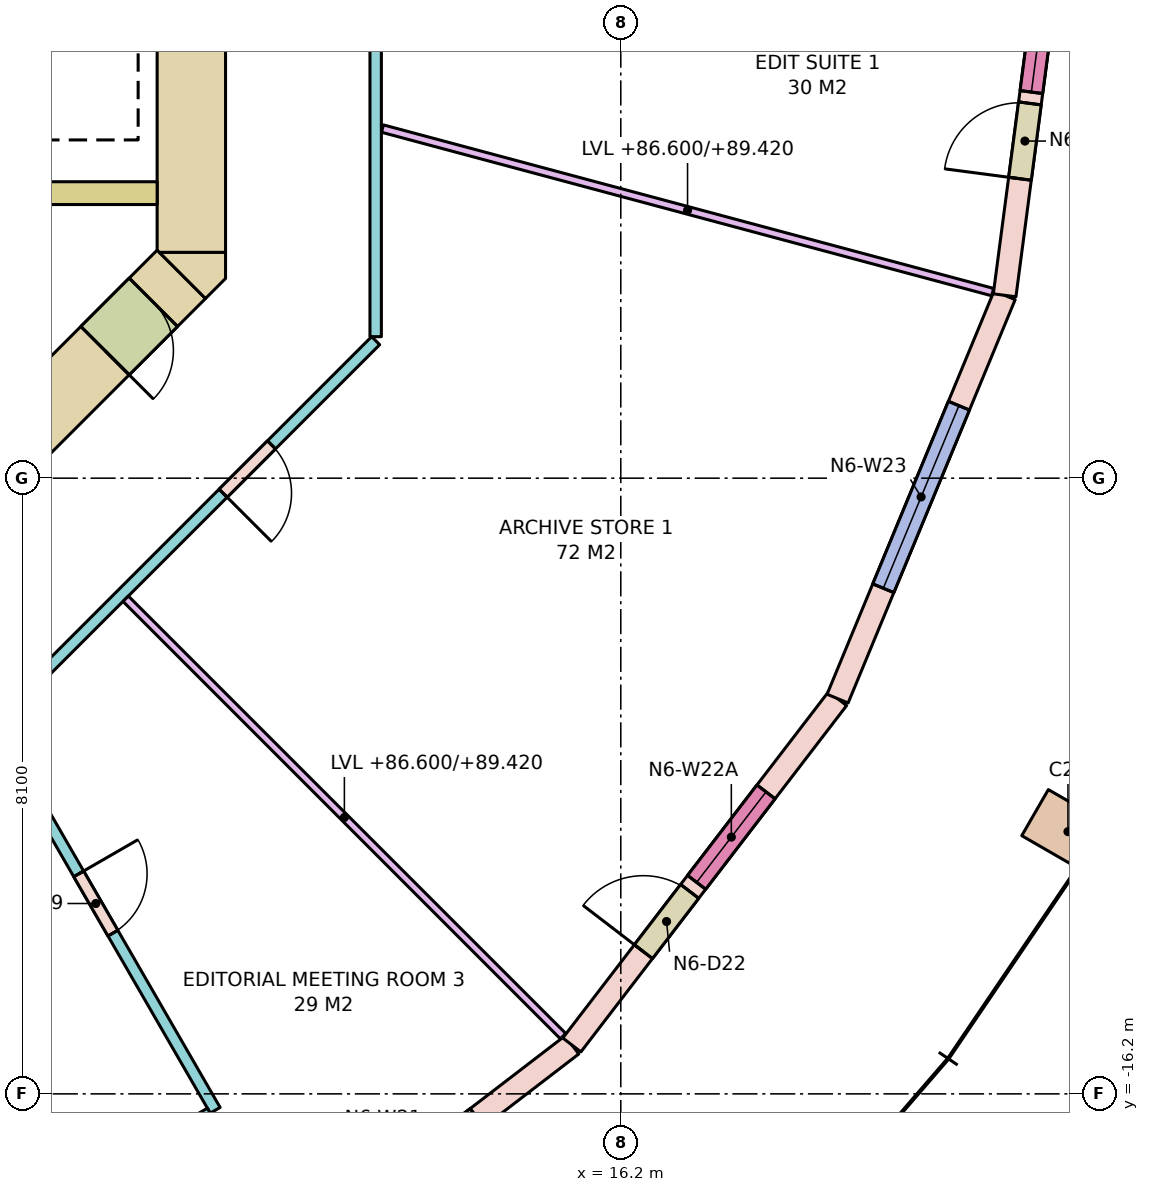
"""IFC4 building model, lengths in metres.
Left out: names, types, materials, properties, quantities, classifications, styles, units other than length and angle.
Written with IfcOpenShell. Run it as: python <this file> out.ifc"""

import sys

from ifc_helpers import new_model, si_unit, direction, frame, frame_2d, origin, origin_2d, place, context, subcontext, project, spatial, polyline, rectangle, outline, extrude, element, fill, save


model = new_model("IFC4")
c1 = context("Model", 3, precision=1e-05, world=origin(), true_north=direction((0.0, 1.0)))
c2 = subcontext(c1, "Body", "Model", "MODEL_VIEW")
j1 = project(units=[si_unit("LENGTHUNIT", "METRE"), si_unit("PLANEANGLEUNIT", "RADIAN")], contexts=[c1])
p1 = place(None, origin())
s1 = spatial("IfcSite", under=j1, at=p1, CompositionType="ELEMENT")
p2 = place(p1, origin())
s2 = spatial("IfcBuilding", under=s1, at=p2, CompositionType="ELEMENT")
p3 = place(p2, frame((0.0, 0.0, 86.6)))
s3 = spatial("IfcBuildingStorey", under=s2, at=p3, CompositionType="ELEMENT", Elevation=86.6)
p4 = place(p3, frame((22.084, -12.75, 0.0), z_axis=(0.0, 0.0, 1.0), x_axis=(0.5, 0.866025403784, 0.0)))
e1 = element("IfcColumn", 1, at=p4, inside=s3, PredefinedType="COLUMN", context=c2, shape_type="SweptSolid", body=[
    extrude(rectangle(XDim=0.7, YDim=1.0, at=origin_2d()), origin(), (0.0, 0.0, 1.0), 4.0),
])
p5 = place(p3, frame((10.55, -5.13, -0.28), z_axis=(0.0, 0.0, 1.0), x_axis=(0.0, 1.0, 0.0)))
e2 = element("IfcWall", 2, at=p5, inside=s3, PredefinedType="SHEAR", context=c2, shape_type="SweptSolid", body=[
    extrude(rectangle(XDim=10.26, YDim=0.9, at=frame_2d((5.13, 0.0))), origin(), (0.0, 0.0, 1.0), 4.0),
])
p6 = place(p5, frame((4.13, 0.0, 0.28)))
e3 = element("IfcOpeningElement", 3, at=p6, cuts=e2, PredefinedType="OPENING", context=c2, shape_type="SweptSolid", body=[
    extrude(rectangle(XDim=2.0, YDim=2.1, at=frame_2d((1.0, 1.05))), frame((0.0, 0.46, 0.0), z_axis=(0.0, -1.0, 0.0), x_axis=(1.0, 0.0, 0.0)), (0.0, 0.0, 1.0), 0.92),
])
p7 = place(p3, frame((10.418, -5.418, -0.28), z_axis=(0.0, 0.0, 1.0), x_axis=(-0.707106781187, -0.707106781187, 0.0)))
e4 = element("IfcWall", 4, at=p7, inside=s3, PredefinedType="SHEAR", context=c2, shape_type="SweptSolid", body=[
    extrude(rectangle(XDim=4.243, YDim=0.9, at=frame_2d((2.121, 0.0))), origin(), (0.0, 0.0, 1.0), 4.0),
])
p8 = place(p7, frame((0.52, 0.0, 0.28)))
e5 = element("IfcOpeningElement", 5, at=p8, cuts=e4, PredefinedType="OPENING", context=c2, shape_type="SweptSolid", body=[
    extrude(rectangle(XDim=0.9, YDim=2.1, at=frame_2d((0.45, 1.05))), frame((0.0, 0.46, 0.0), z_axis=(0.0, -1.0, 0.0), x_axis=(1.0, 0.0, 0.0)), (0.0, 0.0, 1.0), 0.92),
])
p9 = place(p3, frame((0.0, 0.0, -0.28)))
e6 = element("IfcWall", 6, at=p9, inside=s3, PredefinedType="SHEAR", context=c2, shape_type="SweptSolid", body=[
    extrude(outline(polyline([(11.0, -5.473), (10.736, -5.736), (10.13, -5.13), (11.0, -5.13), (11.0, -5.473)])), origin(), (0.0, 0.0, 1.0), 4.0),
])
p10 = place(p3, frame((2.0, -4.35, 0.0), z_axis=(0.0, 0.0, 1.0), x_axis=(1.0, 0.0, 0.0)))
e7 = element("IfcWall", 7, at=p10, inside=s3, PredefinedType="SOLIDWALL", context=c2, shape_type="SweptSolid", body=[
    extrude(rectangle(XDim=8.1, YDim=0.3, at=frame_2d((4.05, 0.0))), origin(), (0.0, 0.0, 1.0), 3.72),
])
p11 = place(p3, frame((11.0, -19.052, 0.0), z_axis=(0.0, 0.0, 1.0), x_axis=(0.793366142647, 0.608744744291, 0.0)))
e8 = element("IfcWall", 8, at=p11, inside=s3, PredefinedType="STANDARD", context=c2, shape_type="SweptSolid", body=[
    extrude(rectangle(XDim=5.743, YDim=0.3, at=frame_2d((2.872, 0.0))), origin(), (0.0, 0.0, 1.0), 3.72),
])
p12 = place(p11, frame((1.572, 0.0, 0.8)))
e9 = element("IfcOpeningElement", 9, at=p12, cuts=e8, PredefinedType="OPENING", context=c2, shape_type="SweptSolid", body=[
    extrude(rectangle(XDim=2.6, YDim=2.7, at=frame_2d((1.3, 1.35))), frame((0.0, 0.16, 0.0), z_axis=(0.0, -1.0, 0.0), x_axis=(1.0, 0.0, 0.0)), (0.0, 0.0, 1.0), 0.32),
])
p13 = place(p3, frame((15.556, -15.556, 0.0), z_axis=(0.0, 0.0, 1.0), x_axis=(0.608744744291, 0.793366142647, 0.0)))
e10 = element("IfcWall", 10, at=p13, inside=s3, PredefinedType="STANDARD", context=c2, shape_type="SweptSolid", body=[
    extrude(rectangle(XDim=5.743, YDim=0.3, at=frame_2d((2.872, 0.0))), origin(), (0.0, 0.0, 1.0), 3.72),
])
p14 = place(p13, frame((1.547, 0.0, 0.0)))
e11 = element("IfcOpeningElement", 11, at=p14, cuts=e10, PredefinedType="OPENING", context=c2, shape_type="SweptSolid", body=[
    extrude(rectangle(XDim=1.0, YDim=2.4, at=frame_2d((0.5, 1.2))), frame((0.0, 0.16, 0.0), z_axis=(0.0, -1.0, 0.0), x_axis=(1.0, 0.0, 0.0)), (0.0, 0.0, 1.0), 0.32),
])
p15 = place(p13, frame((2.697, 0.0, 0.8)))
e12 = element("IfcOpeningElement", 12, at=p15, cuts=e10, PredefinedType="OPENING", context=c2, shape_type="SweptSolid", body=[
    extrude(rectangle(XDim=1.5, YDim=2.7, at=frame_2d((0.75, 1.35))), frame((0.0, 0.16, 0.0), z_axis=(0.0, -1.0, 0.0), x_axis=(1.0, 0.0, 0.0)), (0.0, 0.0, 1.0), 0.32),
])
p16 = place(p3, frame((19.052, -11.0, 0.0), z_axis=(0.0, 0.0, 1.0), x_axis=(0.382715966503, 0.923866055759, 0.0)))
e13 = element("IfcWall", 13, at=p16, inside=s3, PredefinedType="STANDARD", context=c2, shape_type="SweptSolid", body=[
    extrude(rectangle(XDim=5.743, YDim=0.3, at=frame_2d((2.872, 0.0))), origin(), (0.0, 0.0, 1.0), 3.72),
])
p17 = place(p16, frame((1.572, 0.0, 0.8)))
e14 = element("IfcOpeningElement", 14, at=p17, cuts=e13, PredefinedType="OPENING", context=c2, shape_type="SweptSolid", body=[
    extrude(rectangle(XDim=2.6, YDim=2.7, at=frame_2d((1.3, 1.35))), frame((0.0, 0.16, 0.0), z_axis=(0.0, -1.0, 0.0), x_axis=(1.0, 0.0, 0.0)), (0.0, 0.0, 1.0), 0.32),
])
p18 = place(p3, frame((21.25, -5.694, 0.0), z_axis=(0.0, 0.0, 1.0), x_axis=(0.130503995834, 0.991447783331, 0.0)))
e15 = element("IfcWall", 15, at=p18, inside=s3, PredefinedType="STANDARD", context=c2, shape_type="SweptSolid", body=[
    extrude(rectangle(XDim=5.743, YDim=0.3, at=frame_2d((2.872, 0.0))), origin(), (0.0, 0.0, 1.0), 3.72),
])
p19 = place(p18, frame((1.547, 0.0, 0.0)))
e16 = element("IfcOpeningElement", 16, at=p19, cuts=e15, PredefinedType="OPENING", context=c2, shape_type="SweptSolid", body=[
    extrude(rectangle(XDim=1.0, YDim=2.4, at=frame_2d((0.5, 1.2))), frame((0.0, 0.16, 0.0), z_axis=(0.0, -1.0, 0.0), x_axis=(1.0, 0.0, 0.0)), (0.0, 0.0, 1.0), 0.32),
])
p20 = place(p18, frame((2.697, 0.0, 0.8)))
e17 = element("IfcOpeningElement", 17, at=p20, cuts=e15, PredefinedType="OPENING", context=c2, shape_type="SweptSolid", body=[
    extrude(rectangle(XDim=1.5, YDim=2.7, at=frame_2d((0.75, 1.35))), frame((0.0, 0.16, 0.0), z_axis=(0.0, -1.0, 0.0), x_axis=(1.0, 0.0, 0.0)), (0.0, 0.0, 1.0), 0.32),
])
p21 = place(p3, frame((12.975, -1.275, 0.0), z_axis=(0.0, 0.0, 1.0), x_axis=(0.0, -1.0, 0.0)))
e18 = element("IfcWall", 18, at=p21, inside=s3, PredefinedType="PARTITIONING", context=c2, shape_type="SweptSolid", body=[
    extrude(rectangle(XDim=4.963, YDim=0.15, at=frame_2d((2.482, 0.0))), origin(), (0.0, 0.0, 1.0), 2.82),
])
p22 = place(p3, frame((12.975, -6.291, 0.0), z_axis=(0.0, 0.0, 1.0), x_axis=(-0.707106781187, -0.707106781187, 0.0)))
e19 = element("IfcWall", 19, at=p22, inside=s3, PredefinedType="PARTITIONING", context=c2, shape_type="SweptSolid", body=[
    extrude(rectangle(XDim=6.624, YDim=0.15, at=frame_2d((3.312, 0.0))), origin(), (0.0, 0.0, 1.0), 2.82),
])
p23 = place(p22, frame((1.938, 0.0, 0.0)))
e20 = element("IfcOpeningElement", 20, at=p23, cuts=e19, PredefinedType="OPENING", context=c2, shape_type="SweptSolid", body=[
    extrude(rectangle(XDim=0.9, YDim=2.1, at=frame_2d((0.45, 1.05))), frame((0.0, 0.085, 0.0), z_axis=(0.0, -1.0, 0.0), x_axis=(1.0, 0.0, 0.0)), (0.0, 0.0, 1.0), 0.17),
])
p24 = place(p3, frame((7.722, -10.975, 0.0), z_axis=(0.0, 0.0, 1.0), x_axis=(0.499988183684, -0.86603222583, 0.0)))
e21 = element("IfcWall", 21, at=p24, inside=s3, PredefinedType="PARTITIONING", context=c2, shape_type="SweptSolid", body=[
    extrude(rectangle(XDim=6.283, YDim=0.15, at=frame_2d((3.142, 0.0))), origin(), (0.0, 0.0, 1.0), 3.72),
])
p25 = place(p24, frame((2.691, 0.0, 0.0)))
e22 = element("IfcOpeningElement", 22, at=p25, cuts=e21, PredefinedType="OPENING", context=c2, shape_type="SweptSolid", body=[
    extrude(rectangle(XDim=0.9, YDim=2.1, at=frame_2d((0.45, 1.05))), frame((0.0, 0.085, 0.0), z_axis=(0.0, -1.0, 0.0), x_axis=(1.0, 0.0, 0.0)), (0.0, 0.0, 1.0), 0.17),
])
p26 = place(p3, frame((10.799, -16.454, 0.0), z_axis=(0.0, 0.0, 1.0), x_axis=(-0.866017533419, -0.500013631625, 0.0)))
e23 = element("IfcWall", 23, at=p26, inside=s3, PredefinedType="PARTITIONING", context=c2, shape_type="SweptSolid", body=[
    extrude(rectangle(XDim=2.25, YDim=0.15, at=frame_2d((1.125, 0.0))), origin(), (0.0, 0.0, 1.0), 2.82),
])
p27 = place(p3, frame((8.785, -17.616, 0.0), z_axis=(0.0, 0.0, 1.0), x_axis=(-0.500021918639, 0.866012748683, 0.0)))
e24 = element("IfcWall", 24, at=p27, inside=s3, PredefinedType="PARTITIONING", context=c2, shape_type="SweptSolid", body=[
    extrude(rectangle(XDim=7.669, YDim=0.15, at=frame_2d((3.834, 0.0))), origin(), (0.0, 0.0, 1.0), 3.72),
])
p28 = place(p27, frame((3.384, 0.0, 0.0)))
e25 = element("IfcOpeningElement", 25, at=p28, cuts=e24, PredefinedType="OPENING", context=c2, shape_type="SweptSolid", body=[
    extrude(rectangle(XDim=0.9, YDim=2.1, at=frame_2d((0.45, 1.05))), frame((0.0, 0.085, 0.0), z_axis=(0.0, -1.0, 0.0), x_axis=(1.0, 0.0, 0.0)), (0.0, 0.0, 1.0), 0.17),
])
p29 = place(p3, frame((9.686, -9.686, 0.0), z_axis=(0.0, 0.0, 1.0), x_axis=(0.707106781187, -0.707106781187, 0.0)))
e26 = element("IfcWall", 26, at=p29, inside=s3, PredefinedType="PARTITIONING", context=c2, shape_type="SweptSolid", body=[
    extrude(rectangle(XDim=8.139, YDim=0.1, at=frame_2d((4.069, 0.0))), origin(), (0.0, 0.0, 1.0), 2.82),
])
p30 = place(p3, frame((13.064, -3.5, 0.0), z_axis=(0.0, 0.0, 1.0), x_axis=(0.965920254223, -0.258839839442, 0.0)))
e27 = element("IfcWall", 27, at=p30, inside=s3, PredefinedType="PARTITIONING", context=c2, shape_type="SweptSolid", body=[
    extrude(rectangle(XDim=8.312, YDim=0.1, at=frame_2d((4.156, 0.0))), origin(), (0.0, 0.0, 1.0), 2.82),
])
p31 = place(p14, origin())
e28 = element("IfcDoor", 28, at=p31, inside=s3, OperationType="SINGLE_SWING_LEFT", PredefinedType="DOOR", context=c2, shape_type="SweptSolid", body=[
    extrude(rectangle(XDim=1.0, YDim=2.4, at=frame_2d((0.5, 1.2))), frame((0.0, 0.025, 0.0), z_axis=(0.0, -1.0, 0.0), x_axis=(1.0, 0.0, 0.0)), (0.0, 0.0, 1.0), 0.05),
])
fill(e11, e28)
p32 = place(p15, origin())
e29 = element("IfcWindow", 29, at=p32, inside=s3, PartitioningType="SINGLE_PANEL", PredefinedType="WINDOW", context=c2, shape_type="SweptSolid", body=[
    extrude(rectangle(XDim=1.5, YDim=2.7, at=frame_2d((0.75, 1.35))), frame((0.0, 0.03, 0.0), z_axis=(0.0, -1.0, 0.0), x_axis=(1.0, 0.0, 0.0)), (0.0, 0.0, 1.0), 0.06),
])
fill(e12, e29)
p33 = place(p17, origin())
e30 = element("IfcWindow", 30, at=p33, inside=s3, PartitioningType="SINGLE_PANEL", PredefinedType="WINDOW", context=c2, shape_type="SweptSolid", body=[
    extrude(rectangle(XDim=2.6, YDim=2.7, at=frame_2d((1.3, 1.35))), frame((0.0, 0.03, 0.0), z_axis=(0.0, -1.0, 0.0), x_axis=(1.0, 0.0, 0.0)), (0.0, 0.0, 1.0), 0.06),
])
fill(e14, e30)
p34 = place(p19, origin())
e31 = element("IfcDoor", 31, at=p34, inside=s3, OperationType="SINGLE_SWING_LEFT", PredefinedType="DOOR", context=c2, shape_type="SweptSolid", body=[
    extrude(rectangle(XDim=1.0, YDim=2.4, at=frame_2d((0.5, 1.2))), frame((0.0, 0.025, 0.0), z_axis=(0.0, -1.0, 0.0), x_axis=(1.0, 0.0, 0.0)), (0.0, 0.0, 1.0), 0.05),
])
fill(e16, e31)
p35 = place(p20, origin())
e32 = element("IfcWindow", 32, at=p35, inside=s3, PartitioningType="SINGLE_PANEL", PredefinedType="WINDOW", context=c2, shape_type="SweptSolid", body=[
    extrude(rectangle(XDim=1.5, YDim=2.7, at=frame_2d((0.75, 1.35))), frame((0.0, 0.03, 0.0), z_axis=(0.0, -1.0, 0.0), x_axis=(1.0, 0.0, 0.0)), (0.0, 0.0, 1.0), 0.06),
])
fill(e17, e32)
p36 = place(p8, origin())
e33 = element("IfcDoor", 33, at=p36, inside=s3, OperationType="SINGLE_SWING_RIGHT", PredefinedType="DOOR", context=c2, shape_type="SweptSolid", body=[
    extrude(rectangle(XDim=0.9, YDim=2.1, at=frame_2d((0.45, 1.05))), frame((0.0, 0.025, 0.0), z_axis=(0.0, -1.0, 0.0), x_axis=(1.0, 0.0, 0.0)), (0.0, 0.0, 1.0), 0.05),
])
fill(e5, e33)
p37 = place(p25, origin())
e34 = element("IfcDoor", 34, at=p37, inside=s3, OperationType="SINGLE_SWING_LEFT", PredefinedType="DOOR", context=c2, shape_type="SweptSolid", body=[
    extrude(rectangle(XDim=0.9, YDim=2.1, at=frame_2d((0.45, 1.05))), frame((0.0, 0.025, 0.0), z_axis=(0.0, -1.0, 0.0), x_axis=(1.0, 0.0, 0.0)), (0.0, 0.0, 1.0), 0.05),
])
fill(e22, e34)
p38 = place(p23, origin())
e35 = element("IfcDoor", 35, at=p38, inside=s3, OperationType="SINGLE_SWING_RIGHT", PredefinedType="DOOR", context=c2, shape_type="SweptSolid", body=[
    extrude(rectangle(XDim=0.9, YDim=2.1, at=frame_2d((0.45, 1.05))), frame((0.0, 0.025, 0.0), z_axis=(0.0, -1.0, 0.0), x_axis=(1.0, 0.0, 0.0)), (0.0, 0.0, 1.0), 0.05),
])
fill(e20, e35)
save(model, sys.argv[1])
